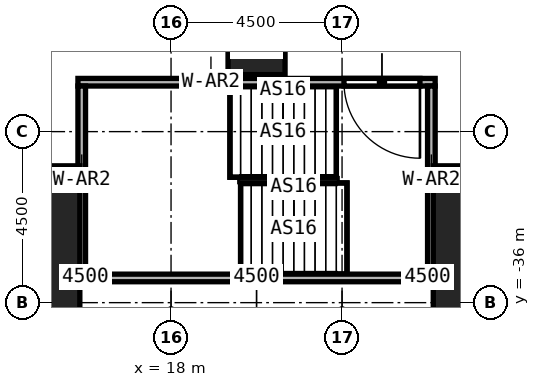
"""IFC4 building model, lengths in metres.
Left out: names, types, materials, properties, quantities, classifications, styles, units other than length and angle.
Written with IfcOpenShell. Run it as: python <this file> out.ifc"""

import sys

from ifc_helpers import new_model, si_unit, direction, frame, frame_2d, origin, origin_2d, place, context, subcontext, project, spatial, rectangle, extrude, element, fill, save


model = new_model("IFC4")
c1 = context("Model", 3, precision=1e-05, world=origin(), true_north=direction((0.0, 1.0)))
c2 = subcontext(c1, "Body", "Model", "MODEL_VIEW")
j1 = project(units=[si_unit("LENGTHUNIT", "METRE"), si_unit("PLANEANGLEUNIT", "RADIAN")], contexts=[c1])
p1 = place(None, origin())
s1 = spatial("IfcSite", under=j1, at=p1, CompositionType="ELEMENT")
p2 = place(p1, origin())
s2 = spatial("IfcBuilding", under=s1, at=p2, CompositionType="ELEMENT")
p3 = place(p2, frame((0.0, 0.0, 12.0)))
s3 = spatial("IfcBuildingStorey", under=s2, at=p3, CompositionType="ELEMENT", Elevation=12.0)
for number, where, z_axis, x_axis in (
    (1, (13.5, -35.7, 0.0), (0.0, 0.0, 1.0), (1.0, 0.0, 0.0)),
    (2, (27.0, -35.7, 0.0), (0.0, 0.0, 1.0), (1.0, 0.0, 0.0)),
):
    element("IfcColumn", number, at=place(p3, frame(where, z_axis=z_axis, x_axis=x_axis)), inside=s3, PredefinedType="COLUMN", context=c2, shape_type="SweptSolid", body=[
        extrude(rectangle(XDim=4.2, YDim=6.6, at=origin_2d()), origin(), (0.0, 0.0, 1.0), 7.0),
    ])
p4 = place(p3, frame((20.25, -29.25, 0.0), z_axis=(0.0, 0.0, 1.0), x_axis=(1.0, 0.0, 0.0)))
e3 = element("IfcColumn", 3, at=p4, inside=s3, PredefinedType="COLUMN", context=c2, shape_type="SweptSolid", body=[
    extrude(rectangle(XDim=1.5, YDim=1.5, at=origin_2d()), origin(), (0.0, 0.0, 1.0), 7.0),
])
p5 = place(p3, frame((24.95, -30.2, 0.0), z_axis=(0.0, 0.0, 1.0), x_axis=(-1.0, 0.0, 0.0)))
e4 = element("IfcWall", 4, at=p5, inside=s3, PredefinedType="SOLIDWALL", context=c2, shape_type="SweptSolid", body=[
    extrude(rectangle(XDim=9.4, YDim=0.2, at=frame_2d((4.7, 0.0))), origin(), (0.0, 0.0, 1.0), 7.0),
])
p6 = place(p5, frame((0.4, 0.0, 0.0)))
e5 = element("IfcOpeningElement", 5, at=p6, cuts=e4, PredefinedType="OPENING", context=c2, shape_type="SweptSolid", body=[
    extrude(rectangle(XDim=2.0, YDim=2.4, at=frame_2d((1.0, 1.2))), frame((0.0, 0.1, 0.0), z_axis=(0.0, -1.0, 0.0), x_axis=(1.0, 0.0, 0.0)), (0.0, 0.0, 1.0), 0.2),
])
p7 = place(p3, frame((15.55, -35.35, 0.0), z_axis=(0.0, 0.0, 1.0), x_axis=(1.0, 0.0, 0.0)))
e6 = element("IfcWall", 6, at=p7, inside=s3, PredefinedType="SOLIDWALL", context=c2, shape_type="SweptSolid", body=[
    extrude(rectangle(XDim=9.4, YDim=0.2, at=frame_2d((4.7, 0.0))), origin(), (0.0, 0.0, 1.0), 7.0),
])
for number, where, z_axis, x_axis in (
    (7, (15.65, -35.25, 0.0), (0.0, 0.0, 1.0), (0.0, 1.0, 0.0)),
    (8, (24.85, -35.25, 0.0), (0.0, 0.0, 1.0), (0.0, 1.0, 0.0)),
):
    element("IfcWall", number, at=place(p3, frame(where, z_axis=z_axis, x_axis=x_axis)), inside=s3, PredefinedType="SOLIDWALL", context=c2, shape_type="SweptSolid", body=[
        extrude(rectangle(XDim=4.95, YDim=0.2, at=frame_2d((2.475, 0.0))), origin(), (0.0, 0.0, 1.0), 7.0),
    ])
p8 = place(p6, origin())
e9 = element("IfcDoor", 9, at=p8, inside=s3, OperationType="DOUBLE_DOOR_SINGLE_SWING", PredefinedType="DOOR", context=c2, shape_type="SweptSolid", body=[
    extrude(rectangle(XDim=2.0, YDim=2.4, at=frame_2d((1.0, 1.2))), frame((0.0, 0.025, 0.0), z_axis=(0.0, -1.0, 0.0), x_axis=(1.0, 0.0, 0.0)), (0.0, 0.0, 1.0), 0.05),
])
fill(e5, e9)
save(model, sys.argv[1])
